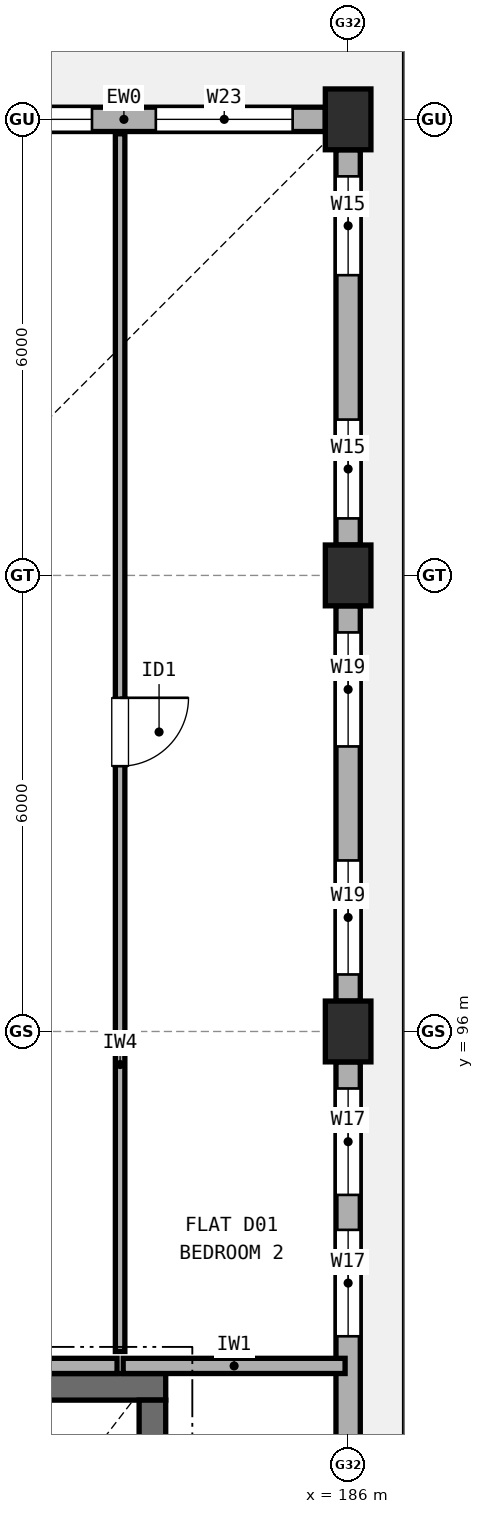
"""IFC4 building model, lengths in metres.
Left out: names, types, materials, properties, quantities, classifications, styles, units other than length and angle.
Written with IfcOpenShell. Run it as: python <this file> out.ifc"""

import sys

from ifc_helpers import new_model, si_unit, direction, frame, frame_2d, origin, origin_2d, place, context, subcontext, project, spatial, rectangle, extrude, element, fill, save


model = new_model("IFC4")
c1 = context("Model", 3, precision=1e-05, world=origin(), true_north=direction((0.0, 1.0)))
c2 = subcontext(c1, "Body", "Model", "MODEL_VIEW")
j1 = project(units=[si_unit("LENGTHUNIT", "METRE"), si_unit("PLANEANGLEUNIT", "RADIAN")], contexts=[c1])
p1 = place(None, origin())
s1 = spatial("IfcSite", under=j1, at=p1, CompositionType="ELEMENT")
p2 = place(p1, origin())
s2 = spatial("IfcBuilding", under=s1, at=p2, CompositionType="ELEMENT")
p3 = place(p2, origin())
s3 = spatial("IfcBuildingStorey", under=s2, at=p3, CompositionType="ELEMENT", Elevation=0.0)
for number, where, z_axis, x_axis in (
    (1, (186.0, 96.0, 0.0), (0.0, 0.0, 1.0), (1.0, 0.0, 0.0)),
    (2, (186.0, 102.0, 0.0), (0.0, 0.0, 1.0), (1.0, 0.0, 0.0)),
    (3, (186.0, 108.0, 0.0), (0.0, 0.0, 1.0), (1.0, 0.0, 0.0)),
):
    element("IfcColumn", number, at=place(p3, frame(where, z_axis=z_axis, x_axis=x_axis)), inside=s3, PredefinedType="COLUMN", context=c2, shape_type="SweptSolid", body=[
        extrude(rectangle(XDim=0.6, YDim=0.8, at=origin_2d()), origin(), (0.0, 0.0, 1.0), 4.23),
    ])
p4 = place(p3, frame((186.0, 90.4, 0.0), z_axis=(0.0, 0.0, 1.0), x_axis=(0.0, 1.0, 0.0)))
e4 = element("IfcWall", 4, at=p4, inside=s3, PredefinedType="STANDARD", context=c2, shape_type="SweptSolid", body=[
    extrude(rectangle(XDim=5.2, YDim=0.32, at=frame_2d((2.6, 0.0))), origin(), (0.0, 0.0, 1.0), 3.712),
])
p5 = place(p4, frame((1.59, 0.0, 0.9)))
e5 = element("IfcOpeningElement", 5, at=p5, cuts=e4, PredefinedType="OPENING", context=c2, shape_type="SweptSolid", body=[
    extrude(rectangle(XDim=1.4, YDim=1.5, at=frame_2d((0.7, 0.75))), frame((0.0, 0.17, 0.0), z_axis=(0.0, -1.0, 0.0), x_axis=(1.0, 0.0, 0.0)), (0.0, 0.0, 1.0), 0.34),
])
p6 = place(p4, frame((3.45, 0.0, 0.9)))
e6 = element("IfcOpeningElement", 6, at=p6, cuts=e4, PredefinedType="OPENING", context=c2, shape_type="SweptSolid", body=[
    extrude(rectangle(XDim=1.4, YDim=1.5, at=frame_2d((0.7, 0.75))), frame((0.0, 0.17, 0.0), z_axis=(0.0, -1.0, 0.0), x_axis=(1.0, 0.0, 0.0)), (0.0, 0.0, 1.0), 0.34),
])
p7 = place(p3, frame((186.0, 96.4, 0.0), z_axis=(0.0, 0.0, 1.0), x_axis=(0.0, 1.0, 0.0)))
e7 = element("IfcWall", 7, at=p7, inside=s3, PredefinedType="STANDARD", context=c2, shape_type="SweptSolid", body=[
    extrude(rectangle(XDim=5.2, YDim=0.32, at=frame_2d((2.6, 0.0))), origin(), (0.0, 0.0, 1.0), 3.712),
])
p8 = place(p7, frame((0.35, 0.0, 0.9)))
e8 = element("IfcOpeningElement", 8, at=p8, cuts=e7, PredefinedType="OPENING", context=c2, shape_type="SweptSolid", body=[
    extrude(rectangle(XDim=1.5, YDim=1.5, at=frame_2d((0.75, 0.75))), frame((0.0, 0.17, 0.0), z_axis=(0.0, -1.0, 0.0), x_axis=(1.0, 0.0, 0.0)), (0.0, 0.0, 1.0), 0.34),
])
p9 = place(p7, frame((3.35, 0.0, 0.9)))
e9 = element("IfcOpeningElement", 9, at=p9, cuts=e7, PredefinedType="OPENING", context=c2, shape_type="SweptSolid", body=[
    extrude(rectangle(XDim=1.5, YDim=1.5, at=frame_2d((0.75, 0.75))), frame((0.0, 0.17, 0.0), z_axis=(0.0, -1.0, 0.0), x_axis=(1.0, 0.0, 0.0)), (0.0, 0.0, 1.0), 0.34),
])
p10 = place(p3, frame((186.0, 102.4, 0.0), z_axis=(0.0, 0.0, 1.0), x_axis=(0.0, 1.0, 0.0)))
e10 = element("IfcWall", 10, at=p10, inside=s3, PredefinedType="STANDARD", context=c2, shape_type="SweptSolid", body=[
    extrude(rectangle(XDim=5.2, YDim=0.32, at=frame_2d((2.6, 0.0))), origin(), (0.0, 0.0, 1.0), 3.712),
])
p11 = place(p10, frame((0.35, 0.0, 0.9)))
e11 = element("IfcOpeningElement", 11, at=p11, cuts=e10, PredefinedType="OPENING", context=c2, shape_type="SweptSolid", body=[
    extrude(rectangle(XDim=1.3, YDim=1.45, at=frame_2d((0.65, 0.725))), frame((0.0, 0.17, 0.0), z_axis=(0.0, -1.0, 0.0), x_axis=(1.0, 0.0, 0.0)), (0.0, 0.0, 1.0), 0.34),
])
p12 = place(p10, frame((3.55, 0.0, 0.9)))
e12 = element("IfcOpeningElement", 12, at=p12, cuts=e10, PredefinedType="OPENING", context=c2, shape_type="SweptSolid", body=[
    extrude(rectangle(XDim=1.3, YDim=1.45, at=frame_2d((0.65, 0.725))), frame((0.0, 0.17, 0.0), z_axis=(0.0, -1.0, 0.0), x_axis=(1.0, 0.0, 0.0)), (0.0, 0.0, 1.0), 0.34),
])
p13 = place(p3, frame((185.7, 108.0, 0.0), z_axis=(0.0, 0.0, 1.0), x_axis=(-1.0, 0.0, 0.0)))
e13 = element("IfcWall", 13, at=p13, inside=s3, PredefinedType="STANDARD", context=c2, shape_type="SweptSolid", body=[
    extrude(rectangle(XDim=5.35, YDim=0.32, at=frame_2d((2.675, 0.0))), origin(), (0.0, 0.0, 1.0), 3.112),
])
p14 = place(p13, frame((0.43, 0.0, 0.9)))
e14 = element("IfcOpeningElement", 14, at=p14, cuts=e13, PredefinedType="OPENING", context=c2, shape_type="SweptSolid", body=[
    extrude(rectangle(XDim=1.8, YDim=1.6, at=frame_2d((0.9, 0.8))), frame((0.0, 0.17, 0.0), z_axis=(0.0, -1.0, 0.0), x_axis=(1.0, 0.0, 0.0)), (0.0, 0.0, 1.0), 0.34),
])
p15 = place(p13, frame((3.07, 0.0, 0.9)))
e15 = element("IfcOpeningElement", 15, at=p15, cuts=e13, PredefinedType="OPENING", context=c2, shape_type="SweptSolid", body=[
    extrude(rectangle(XDim=1.95, YDim=1.55, at=frame_2d((0.975, 0.775))), frame((0.0, 0.17, 0.0), z_axis=(0.0, -1.0, 0.0), x_axis=(1.0, 0.0, 0.0)), (0.0, 0.0, 1.0), 0.34),
])
p16 = place(p3, frame((183.6, 91.325, 0.0), z_axis=(0.0, 0.0, 1.0), x_axis=(-1.0, 0.0, 0.0)))
e16 = element("IfcWall", 16, at=p16, inside=s3, PredefinedType="SHEAR", context=c2, shape_type="SweptSolid", body=[
    extrude(rectangle(XDim=5.05, YDim=0.35, at=frame_2d((2.525, 0.0))), origin(), (0.0, 0.0, 1.0), 4.23),
])
p17 = place(p3, frame((183.425, 84.75, 0.0), z_axis=(0.0, 0.0, 1.0), x_axis=(0.0, 1.0, 0.0)))
e17 = element("IfcWall", 17, at=p17, inside=s3, PredefinedType="SHEAR", context=c2, shape_type="SweptSolid", body=[
    extrude(rectangle(XDim=6.4, YDim=0.35, at=frame_2d((3.2, 0.0))), origin(), (0.0, 0.0, 1.0), 4.23),
])
p18 = place(p3, frame((171.04, 91.6, 0.0), z_axis=(0.0, 0.0, 1.0), x_axis=(1.0, 0.0, 0.0)))
e18 = element("IfcWall", 18, at=p18, inside=s3, PredefinedType="SOLIDWALL", context=c2, shape_type="SweptSolid", body=[
    extrude(rectangle(XDim=11.92, YDim=0.2, at=frame_2d((5.96, 0.0))), origin(), (0.0, 0.0, 1.0), 4.23),
])
p19 = place(p18, frame((5.47, 0.0, 0.0)))
e19 = element("IfcOpeningElement", 19, at=p19, cuts=e18, PredefinedType="OPENING", context=c2, shape_type="SweptSolid", body=[
    extrude(rectangle(XDim=0.98, YDim=2.15, at=frame_2d((0.49, 1.075))), frame((0.0, 0.11, 0.0), z_axis=(0.0, -1.0, 0.0), x_axis=(1.0, 0.0, 0.0)), (0.0, 0.0, 1.0), 0.22),
])
p20 = place(p3, frame((183.04, 91.6, 0.0), z_axis=(0.0, 0.0, 1.0), x_axis=(1.0, 0.0, 0.0)))
e20 = element("IfcWall", 20, at=p20, inside=s3, PredefinedType="SOLIDWALL", context=c2, shape_type="SweptSolid", body=[
    extrude(rectangle(XDim=2.92, YDim=0.2, at=frame_2d((1.46, 0.0))), origin(), (0.0, 0.0, 1.0), 3.712),
])
p21 = place(p3, frame((183.0, 91.79, 0.0), z_axis=(0.0, 0.0, 1.0), x_axis=(0.0, 1.0, 0.0)))
e21 = element("IfcWall", 21, at=p21, inside=s3, PredefinedType="PARTITIONING", context=c2, shape_type="SweptSolid", body=[
    extrude(rectangle(XDim=16.02, YDim=0.125, at=frame_2d((8.01, 0.0))), origin(), (0.0, 0.0, 1.0), 3.112),
])
p22 = place(p21, frame((7.7, 0.0, 0.0)))
e22 = element("IfcOpeningElement", 22, at=p22, cuts=e21, PredefinedType="OPENING", context=c2, shape_type="SweptSolid", body=[
    extrude(rectangle(XDim=0.9, YDim=2.1, at=frame_2d((0.45, 1.05))), frame((0.0, 0.073, 0.0), z_axis=(0.0, -1.0, 0.0), x_axis=(1.0, 0.0, 0.0)), (0.0, 0.0, 1.0), 0.145),
])
p23 = place(p5, origin())
e23 = element("IfcWindow", 23, at=p23, inside=s3, PartitioningType="SINGLE_PANEL", PredefinedType="WINDOW", context=c2, shape_type="SweptSolid", body=[
    extrude(rectangle(XDim=1.4, YDim=1.5, at=frame_2d((0.7, 0.75))), frame((0.0, 0.03, 0.0), z_axis=(0.0, -1.0, 0.0), x_axis=(1.0, 0.0, 0.0)), (0.0, 0.0, 1.0), 0.06),
])
fill(e5, e23)
p24 = place(p6, origin())
e24 = element("IfcWindow", 24, at=p24, inside=s3, PartitioningType="SINGLE_PANEL", PredefinedType="WINDOW", context=c2, shape_type="SweptSolid", body=[
    extrude(rectangle(XDim=1.4, YDim=1.5, at=frame_2d((0.7, 0.75))), frame((0.0, 0.03, 0.0), z_axis=(0.0, -1.0, 0.0), x_axis=(1.0, 0.0, 0.0)), (0.0, 0.0, 1.0), 0.06),
])
fill(e6, e24)
p25 = place(p8, origin())
e25 = element("IfcWindow", 25, at=p25, inside=s3, PartitioningType="SINGLE_PANEL", PredefinedType="WINDOW", context=c2, shape_type="SweptSolid", body=[
    extrude(rectangle(XDim=1.5, YDim=1.5, at=frame_2d((0.75, 0.75))), frame((0.0, 0.03, 0.0), z_axis=(0.0, -1.0, 0.0), x_axis=(1.0, 0.0, 0.0)), (0.0, 0.0, 1.0), 0.06),
])
fill(e8, e25)
p26 = place(p9, origin())
e26 = element("IfcWindow", 26, at=p26, inside=s3, PartitioningType="SINGLE_PANEL", PredefinedType="WINDOW", context=c2, shape_type="SweptSolid", body=[
    extrude(rectangle(XDim=1.5, YDim=1.5, at=frame_2d((0.75, 0.75))), frame((0.0, 0.03, 0.0), z_axis=(0.0, -1.0, 0.0), x_axis=(1.0, 0.0, 0.0)), (0.0, 0.0, 1.0), 0.06),
])
fill(e9, e26)
p27 = place(p11, origin())
e27 = element("IfcWindow", 27, at=p27, inside=s3, PartitioningType="SINGLE_PANEL", PredefinedType="WINDOW", context=c2, shape_type="SweptSolid", body=[
    extrude(rectangle(XDim=1.3, YDim=1.45, at=frame_2d((0.65, 0.725))), frame((0.0, 0.03, 0.0), z_axis=(0.0, -1.0, 0.0), x_axis=(1.0, 0.0, 0.0)), (0.0, 0.0, 1.0), 0.06),
])
fill(e11, e27)
p28 = place(p12, origin())
e28 = element("IfcWindow", 28, at=p28, inside=s3, PartitioningType="SINGLE_PANEL", PredefinedType="WINDOW", context=c2, shape_type="SweptSolid", body=[
    extrude(rectangle(XDim=1.3, YDim=1.45, at=frame_2d((0.65, 0.725))), frame((0.0, 0.03, 0.0), z_axis=(0.0, -1.0, 0.0), x_axis=(1.0, 0.0, 0.0)), (0.0, 0.0, 1.0), 0.06),
])
fill(e12, e28)
p29 = place(p14, origin())
e29 = element("IfcWindow", 29, at=p29, inside=s3, PartitioningType="SINGLE_PANEL", PredefinedType="WINDOW", context=c2, shape_type="SweptSolid", body=[
    extrude(rectangle(XDim=1.8, YDim=1.6, at=frame_2d((0.9, 0.8))), frame((0.0, 0.03, 0.0), z_axis=(0.0, -1.0, 0.0), x_axis=(1.0, 0.0, 0.0)), (0.0, 0.0, 1.0), 0.06),
])
fill(e14, e29)
p30 = place(p15, origin())
e30 = element("IfcWindow", 30, at=p30, inside=s3, PartitioningType="SINGLE_PANEL", PredefinedType="WINDOW", context=c2, shape_type="SweptSolid", body=[
    extrude(rectangle(XDim=1.95, YDim=1.55, at=frame_2d((0.975, 0.775))), frame((0.0, 0.03, 0.0), z_axis=(0.0, -1.0, 0.0), x_axis=(1.0, 0.0, 0.0)), (0.0, 0.0, 1.0), 0.06),
])
fill(e15, e30)
p31 = place(p22, origin())
e31 = element("IfcDoor", 31, at=p31, inside=s3, OperationType="SINGLE_SWING_RIGHT", PredefinedType="DOOR", context=c2, shape_type="SweptSolid", body=[
    extrude(rectangle(XDim=0.9, YDim=2.1, at=frame_2d((0.45, 1.05))), frame((0.0, 0.025, 0.0), z_axis=(0.0, -1.0, 0.0), x_axis=(1.0, 0.0, 0.0)), (0.0, 0.0, 1.0), 0.05),
])
fill(e22, e31)
save(model, sys.argv[1])
